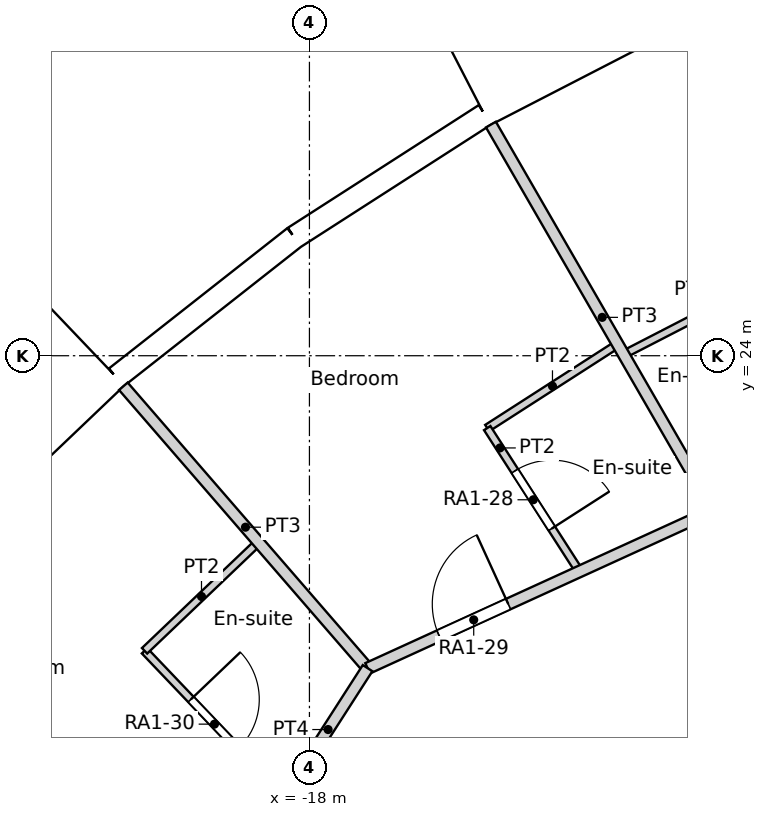
"""IFC4 building model, lengths in metres.
Left out: names, types, materials, properties, quantities, classifications, styles, units other than length and angle.
Written with IfcOpenShell. Run it as: python <this file> out.ifc"""

import sys

from ifc_helpers import new_model, si_unit, direction, frame, frame_2d, origin, origin_2d, place, context, subcontext, project, spatial, rectangle, circle, extrude, element, fill, save


model = new_model("IFC4")
c1 = context("Model", 3, precision=1e-05, world=origin(), true_north=direction((0.0, 1.0)))
c2 = subcontext(c1, "Body", "Model", "MODEL_VIEW")
j1 = project(units=[si_unit("LENGTHUNIT", "METRE"), si_unit("PLANEANGLEUNIT", "RADIAN")], contexts=[c1])
p1 = place(None, origin())
s1 = spatial("IfcSite", under=j1, at=p1, CompositionType="ELEMENT")
p2 = place(p1, origin())
s2 = spatial("IfcBuilding", under=s1, at=p2, CompositionType="ELEMENT")
p3 = place(p2, frame((0.0, 0.0, 28.2)))
s3 = spatial("IfcBuildingStorey", under=s2, at=p3, CompositionType="ELEMENT", Elevation=28.2)
for number, where, z_axis, x_axis in (
    (1, (-15.137, 26.219, 0.0), (0.0, 0.0, 1.0), (1.0, 0.0, 0.0)),
    (2, (-19.826, 22.88, 0.0), (0.0, 0.0, 1.0), (1.0, 0.0, 0.0)),
):
    element("IfcColumn", number, at=place(p3, frame(where, z_axis=z_axis, x_axis=x_axis)), inside=s3, PredefinedType="COLUMN", context=c2, shape_type="SweptSolid", body=[
        extrude(circle(Radius=0.7, at=origin_2d()), origin(), (0.0, 0.0, 1.0), 3.6),
    ])
p4 = place(p3, frame((-13.291, 29.053, -0.45), z_axis=(0.0, 0.0, 1.0), x_axis=(-0.888858064689, -0.458182650083, 0.0)))
e3 = element("IfcWall", 3, at=p4, inside=s3, PredefinedType="ELEMENTEDWALL", context=c2, shape_type="SweptSolid", body=[
    extrude(rectangle(XDim=3.0, YDim=1.45, at=frame_2d((1.5, 0.0))), origin(), (0.0, 0.0, 1.0), 3.6),
])
p5 = place(p4, frame((1.5, 0.0, 2.0)))
e4 = element("IfcOpeningElement", 4, at=p5, cuts=e3, PredefinedType="OPENING", context=c2, shape_type="SweptSolid", body=[
    extrude(circle(Radius=0.9, at=origin_2d()), frame((0.0, 0.735, 0.0), z_axis=(0.0, -1.0, 0.0), x_axis=(1.0, 0.0, 0.0)), (0.0, 0.0, 1.0), 1.47),
])
p6 = place(p3, frame((-15.692, 27.168, 0.0), z_axis=(0.0, 0.0, 1.0), x_axis=(-0.841260995538, -0.54062920508, 0.0)))
e5 = element("IfcWall", 5, at=p6, inside=s3, PredefinedType="SOLIDWALL", context=c2, shape_type="SweptSolid", body=[
    extrude(rectangle(XDim=2.979, YDim=0.3, at=frame_2d((1.49, 0.0))), origin(), (0.0, 0.0, 1.0), 3.15),
])
p7 = place(p6, frame((1.49, 0.0, 1.55)))
e6 = element("IfcOpeningElement", 6, at=p7, cuts=e5, PredefinedType="OPENING", context=c2, shape_type="SweptSolid", body=[
    extrude(circle(Radius=0.9, at=origin_2d()), frame((0.0, 0.16, 0.0), z_axis=(0.0, -1.0, 0.0), x_axis=(1.0, 0.0, 0.0)), (0.0, 0.0, 1.0), 0.32),
])
p8 = place(p3, frame((-18.199, 25.557, 0.0), z_axis=(0.0, 0.0, 1.0), x_axis=(-0.786053834673, -0.618158045322, 0.0)))
e7 = element("IfcWall", 7, at=p8, inside=s3, PredefinedType="SOLIDWALL", context=c2, shape_type="SweptSolid", body=[
    extrude(rectangle(XDim=2.979, YDim=0.3, at=frame_2d((1.49, 0.0))), origin(), (0.0, 0.0, 1.0), 3.15),
])
p9 = place(p8, frame((1.49, 0.0, 1.55)))
e8 = element("IfcOpeningElement", 8, at=p9, cuts=e7, PredefinedType="OPENING", context=c2, shape_type="SweptSolid", body=[
    extrude(circle(Radius=0.9, at=origin_2d()), frame((0.0, 0.16, 0.0), z_axis=(0.0, -1.0, 0.0), x_axis=(1.0, 0.0, 0.0)), (0.0, 0.0, 1.0), 0.32),
])
p10 = place(p3, frame((-20.938, 24.132, -0.45), z_axis=(0.0, 0.0, 1.0), x_axis=(-0.723712023899, -0.690102098579, 0.0)))
e9 = element("IfcWall", 9, at=p10, inside=s3, PredefinedType="ELEMENTEDWALL", context=c2, shape_type="SweptSolid", body=[
    extrude(rectangle(XDim=3.0, YDim=1.45, at=frame_2d((1.5, 0.0))), origin(), (0.0, 0.0, 1.0), 3.6),
])
p11 = place(p10, frame((1.5, 0.0, 2.0)))
e10 = element("IfcOpeningElement", 10, at=p11, cuts=e9, PredefinedType="OPENING", context=c2, shape_type="SweptSolid", body=[
    extrude(circle(Radius=0.9, at=origin_2d()), frame((0.0, 0.735, 0.0), z_axis=(0.0, -1.0, 0.0), x_axis=(1.0, 0.0, 0.0)), (0.0, 0.0, 1.0), 1.47),
])
p12 = place(p3, frame((-14.0, 17.092, 0.0), z_axis=(0.0, 0.0, 1.0), x_axis=(0.86602719091, 0.499996904595, 0.0)))
e11 = element("IfcWall", 11, at=p12, inside=s3, PredefinedType="PARTITIONING", context=c2, shape_type="SweptSolid", body=[
    extrude(rectangle(XDim=9.42, YDim=0.15, at=frame_2d((4.71, 0.0))), origin(), (0.0, 0.0, 1.0), 3.15),
])
p13 = place(p3, frame((-17.234, 19.888, 0.0), z_axis=(0.0, 0.0, 1.0), x_axis=(0.90953867323, 0.415619299238, 0.0)))
e12 = element("IfcWall", 12, at=p13, inside=s3, PredefinedType="PARTITIONING", context=c2, shape_type="SweptSolid", body=[
    extrude(rectangle(XDim=14.829, YDim=0.15, at=frame_2d((7.415, 0.0))), origin(), (0.0, 0.0, 1.0), 3.15),
])
p14 = place(p13, frame((12.797, 0.0, 0.0)))
e13 = element("IfcOpeningElement", 13, at=p14, cuts=e12, PredefinedType="OPENING", context=c2, shape_type="SweptSolid", body=[
    extrude(rectangle(XDim=1.0, YDim=2.1, at=frame_2d((0.5, 1.05))), frame((0.0, 0.075, 0.0), z_axis=(0.0, -1.0, 0.0), x_axis=(1.0, 0.0, 0.0)), (0.0, 0.0, 1.0), 0.15),
])
p15 = place(p13, frame((7.877, 0.0, 0.0)))
e14 = element("IfcOpeningElement", 14, at=p15, cuts=e12, PredefinedType="OPENING", context=c2, shape_type="SweptSolid", body=[
    extrude(rectangle(XDim=1.0, YDim=2.1, at=frame_2d((0.5, 1.05))), frame((0.0, 0.075, 0.0), z_axis=(0.0, -1.0, 0.0), x_axis=(1.0, 0.0, 0.0)), (0.0, 0.0, 1.0), 0.15),
])
p16 = place(p13, frame((1.034, 0.0, 0.0)))
e15 = element("IfcOpeningElement", 15, at=p16, cuts=e12, PredefinedType="OPENING", context=c2, shape_type="SweptSolid", body=[
    extrude(rectangle(XDim=1.0, YDim=2.1, at=frame_2d((0.5, 1.05))), frame((0.0, 0.075, 0.0), z_axis=(0.0, -1.0, 0.0), x_axis=(1.0, 0.0, 0.0)), (0.0, 0.0, 1.0), 0.15),
])
p17 = place(p3, frame((-18.274, 18.274, 0.0), z_axis=(0.0, 0.0, 1.0), x_axis=(0.540751168176, 0.841182604502, 0.0)))
e16 = element("IfcWall", 16, at=p17, inside=s3, PredefinedType="PARTITIONING", context=c2, shape_type="SweptSolid", body=[
    extrude(rectangle(XDim=1.921, YDim=0.15, at=frame_2d((0.96, 0.0))), origin(), (0.0, 0.0, 1.0), 3.15),
])
p18 = place(p3, frame((-13.866, 24.016, 0.0), z_axis=(0.0, 0.0, 1.0), x_axis=(0.888861985525, 0.45817504372, 0.0)))
e17 = element("IfcWall", 17, at=p18, inside=s3, PredefinedType="PARTITIONING", context=c2, shape_type="SweptSolid", body=[
    extrude(rectangle(XDim=2.034, YDim=0.1, at=frame_2d((1.017, 0.0))), origin(), (0.0, 0.0, 1.0), 3.15),
])
p19 = place(p3, frame((-15.612, 27.041, 0.0), z_axis=(0.0, 0.0, 1.0), x_axis=(0.499824700643, -0.866126589262, 0.0)))
e18 = element("IfcWall", 18, at=p19, inside=s3, PredefinedType="PARTITIONING", context=c2, shape_type="SweptSolid", body=[
    extrude(rectangle(XDim=5.856, YDim=0.15, at=frame_2d((2.928, 0.0))), origin(), (0.0, 0.0, 1.0), 3.15),
])
p20 = place(p3, frame((-15.661, 23.048, 0.0), z_axis=(0.0, 0.0, 1.0), x_axis=(0.84110074148, 0.540878491606, 0.0)))
e19 = element("IfcWall", 19, at=p20, inside=s3, PredefinedType="PARTITIONING", context=c2, shape_type="SweptSolid", body=[
    extrude(rectangle(XDim=2.041, YDim=0.1, at=frame_2d((1.021, 0.0))), origin(), (0.0, 0.0, 1.0), 3.15),
])
p21 = place(p3, frame((-15.661, 23.048, 0.0), z_axis=(0.0, 0.0, 1.0), x_axis=(0.540796133976, -0.841153696702, 0.0)))
e20 = element("IfcWall", 20, at=p21, inside=s3, PredefinedType="PARTITIONING", context=c2, shape_type="SweptSolid", body=[
    extrude(rectangle(XDim=2.241, YDim=0.1, at=frame_2d((1.121, 0.0))), origin(), (0.0, 0.0, 1.0), 3.15),
])
p22 = place(p21, frame((0.671, 0.0, 0.0)))
e21 = element("IfcOpeningElement", 21, at=p22, cuts=e20, PredefinedType="OPENING", context=c2, shape_type="SweptSolid", body=[
    extrude(rectangle(XDim=0.9, YDim=2.04, at=frame_2d((0.45, 1.02))), frame((0.0, 0.05, 0.0), z_axis=(0.0, -1.0, 0.0), x_axis=(1.0, 0.0, 0.0)), (0.0, 0.0, 1.0), 0.1),
])
p23 = place(p3, frame((-20.448, 23.598, 0.0), z_axis=(0.0, 0.0, 1.0), x_axis=(0.654900226821, -0.755715351776, 0.0)))
e22 = element("IfcWall", 22, at=p23, inside=s3, PredefinedType="PARTITIONING", context=c2, shape_type="SweptSolid", body=[
    extrude(rectangle(XDim=4.906, YDim=0.15, at=frame_2d((2.453, 0.0))), origin(), (0.0, 0.0, 1.0), 3.15),
])
p24 = place(p3, frame((-20.169, 20.118, 0.0), z_axis=(0.0, 0.0, 1.0), x_axis=(0.723537557066, 0.690285016145, 0.0)))
e23 = element("IfcWall", 23, at=p24, inside=s3, PredefinedType="PARTITIONING", context=c2, shape_type="SweptSolid", body=[
    extrude(rectangle(XDim=2.071, YDim=0.1, at=frame_2d((1.035, 0.0))), origin(), (0.0, 0.0, 1.0), 3.15),
])
p25 = place(p3, frame((-20.169, 20.118, 0.0), z_axis=(0.0, 0.0, 1.0), x_axis=(0.690011756227, -0.723798159896, 0.0)))
e24 = element("IfcWall", 24, at=p25, inside=s3, PredefinedType="PARTITIONING", context=c2, shape_type="SweptSolid", body=[
    extrude(rectangle(XDim=2.667, YDim=0.1, at=frame_2d((1.333, 0.0))), origin(), (0.0, 0.0, 1.0), 3.15),
])
p26 = place(p25, frame((0.883, 0.0, 0.0)))
e25 = element("IfcOpeningElement", 25, at=p26, cuts=e24, PredefinedType="OPENING", context=c2, shape_type="SweptSolid", body=[
    extrude(rectangle(XDim=0.9, YDim=2.04, at=frame_2d((0.45, 1.02))), frame((0.0, 0.05, 0.0), z_axis=(0.0, -1.0, 0.0), x_axis=(1.0, 0.0, 0.0)), (0.0, 0.0, 1.0), 0.1),
])
p27 = place(p3, frame((-24.544, 19.302, 0.0), z_axis=(0.0, 0.0, 1.0), x_axis=(0.786014513829, -0.618208042693, 0.0)))
e26 = element("IfcWall", 26, at=p27, inside=s3, PredefinedType="PARTITIONING", context=c2, shape_type="SweptSolid", body=[
    extrude(rectangle(XDim=5.857, YDim=0.15, at=frame_2d((2.929, 0.0))), origin(), (0.0, 0.0, 1.0), 3.15),
])
p28 = place(p5, origin())
e27 = element("IfcWindow", 27, at=p28, inside=s3, PartitioningType="SINGLE_PANEL", PredefinedType="WINDOW", context=c2, shape_type="SweptSolid", body=[
    extrude(circle(Radius=0.9, at=origin_2d()), frame((0.0, 0.695, 0.0), z_axis=(0.0, -1.0, 0.0), x_axis=(1.0, 0.0, 0.0)), (0.0, 0.0, 1.0), 0.1),
])
fill(e4, e27)
p29 = place(p7, origin())
e28 = element("IfcWindow", 28, at=p29, inside=s3, PartitioningType="SINGLE_PANEL", PredefinedType="WINDOW", context=c2, shape_type="SweptSolid", body=[
    extrude(circle(Radius=0.9, at=origin_2d()), frame((0.0, 0.12, 0.0), z_axis=(0.0, -1.0, 0.0), x_axis=(1.0, 0.0, 0.0)), (0.0, 0.0, 1.0), 0.1),
])
fill(e6, e28)
p30 = place(p9, origin())
e29 = element("IfcWindow", 29, at=p30, inside=s3, PartitioningType="SINGLE_PANEL", PredefinedType="WINDOW", context=c2, shape_type="SweptSolid", body=[
    extrude(circle(Radius=0.9, at=origin_2d()), frame((0.0, 0.12, 0.0), z_axis=(0.0, -1.0, 0.0), x_axis=(1.0, 0.0, 0.0)), (0.0, 0.0, 1.0), 0.1),
])
fill(e8, e29)
p31 = place(p11, origin())
e30 = element("IfcWindow", 30, at=p31, inside=s3, PartitioningType="SINGLE_PANEL", PredefinedType="WINDOW", context=c2, shape_type="SweptSolid", body=[
    extrude(circle(Radius=0.9, at=origin_2d()), frame((0.0, 0.695, 0.0), z_axis=(0.0, -1.0, 0.0), x_axis=(1.0, 0.0, 0.0)), (0.0, 0.0, 1.0), 0.1),
])
fill(e10, e30)
p32 = place(p22, origin())
e31 = element("IfcDoor", 31, at=p32, inside=s3, OperationType="SINGLE_SWING_RIGHT", PredefinedType="DOOR", context=c2, shape_type="SweptSolid", body=[
    extrude(rectangle(XDim=0.9, YDim=2.04, at=frame_2d((0.45, 1.02))), frame((0.0, 0.025, 0.0), z_axis=(0.0, -1.0, 0.0), x_axis=(1.0, 0.0, 0.0)), (0.0, 0.0, 1.0), 0.05),
])
fill(e21, e31)
p33 = place(p16, origin())
e32 = element("IfcDoor", 32, at=p33, inside=s3, OperationType="SINGLE_SWING_RIGHT", PredefinedType="DOOR", context=c2, shape_type="SweptSolid", body=[
    extrude(rectangle(XDim=1.0, YDim=2.1, at=frame_2d((0.5, 1.05))), frame((0.0, 0.025, 0.0), z_axis=(0.0, -1.0, 0.0), x_axis=(1.0, 0.0, 0.0)), (0.0, 0.0, 1.0), 0.05),
])
fill(e15, e32)
p34 = place(p26, origin())
e33 = element("IfcDoor", 33, at=p34, inside=s3, OperationType="SINGLE_SWING_LEFT", PredefinedType="DOOR", context=c2, shape_type="SweptSolid", body=[
    extrude(rectangle(XDim=0.9, YDim=2.04, at=frame_2d((0.45, 1.02))), frame((0.0, 0.025, 0.0), z_axis=(0.0, -1.0, 0.0), x_axis=(1.0, 0.0, 0.0)), (0.0, 0.0, 1.0), 0.05),
])
fill(e25, e33)
save(model, sys.argv[1])
